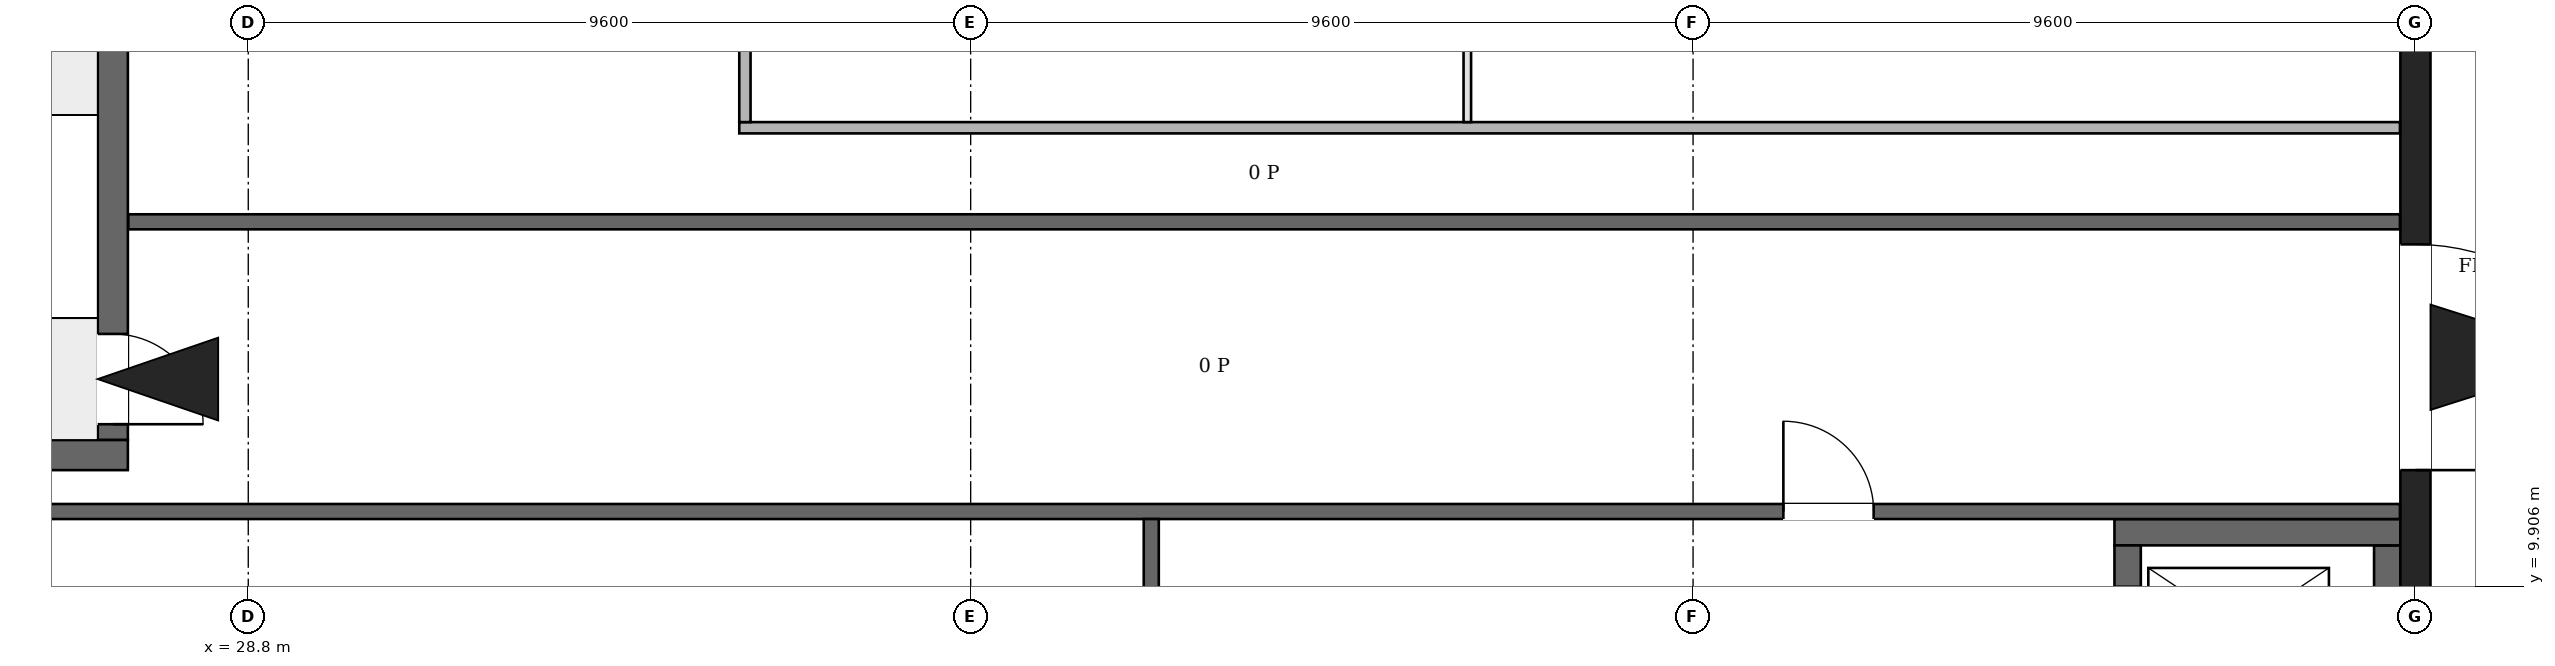
"""IFC4 building model, lengths in metres.
Left out: names, types, materials, properties, quantities, classifications, styles, units other than length and angle.
Written with IfcOpenShell. Run it as: python <this file> out.ifc"""

import sys

from ifc_helpers import new_model, si_unit, direction, frame, frame_2d, origin, place, context, subcontext, project, spatial, rectangle, extrude, element, fill, save


model = new_model("IFC4")
c1 = context("Model", 3, precision=1e-05, world=origin(), true_north=direction((0.0, 1.0)))
c2 = subcontext(c1, "Body", "Model", "MODEL_VIEW")
j1 = project(units=[si_unit("LENGTHUNIT", "METRE"), si_unit("PLANEANGLEUNIT", "RADIAN")], contexts=[c1])
p1 = place(None, origin())
s1 = spatial("IfcSite", under=j1, at=p1, CompositionType="ELEMENT")
p2 = place(p1, origin())
s2 = spatial("IfcBuilding", under=s1, at=p2, CompositionType="ELEMENT")
p3 = place(p2, origin())
s3 = spatial("IfcBuildingStorey", under=s2, at=p3, CompositionType="ELEMENT", Elevation=0.0)
p4 = place(p3, frame((57.6, -0.2, 0.0), z_axis=(0.0, 0.0, 1.0), x_axis=(0.0, 1.0, 0.0)))
e1 = element("IfcWall", 1, at=p4, inside=s3, PredefinedType="SHEAR", context=c2, shape_type="SweptSolid", body=[
    extrude(rectangle(XDim=46.88, YDim=0.4, at=frame_2d((23.44, 0.0))), origin(), (0.0, 0.0, 1.0), 6.5),
])
p5 = place(p4, frame((11.65, 0.0, 0.0)))
e2 = element("IfcOpeningElement", 2, at=p5, cuts=e1, PredefinedType="OPENING", context=c2, shape_type="SweptSolid", body=[
    extrude(rectangle(XDim=3.0, YDim=2.4, at=frame_2d((1.5, 1.2))), frame((0.0, 0.21, 0.0), z_axis=(0.0, -1.0, 0.0), x_axis=(1.0, 0.0, 0.0)), (0.0, 0.0, 1.0), 0.42),
])
p6 = place(p4, frame((38.2, 0.0, 0.0)))
e3 = element("IfcOpeningElement", 3, at=p6, cuts=e1, PredefinedType="OPENING", context=c2, shape_type="SweptSolid", body=[
    extrude(rectangle(XDim=3.0, YDim=2.4, at=frame_2d((1.5, 1.2))), frame((0.0, 0.21, 0.0), z_axis=(0.0, -1.0, 0.0), x_axis=(1.0, 0.0, 0.0)), (0.0, 0.0, 1.0), 0.42),
])
p7 = place(p3, frame((23.0, 11.65, 0.0), z_axis=(0.0, 0.0, 1.0), x_axis=(1.0, 0.0, 0.0)))
e4 = element("IfcWall", 4, at=p7, inside=s3, PredefinedType="SHEAR", context=c2, shape_type="SweptSolid", body=[
    extrude(rectangle(XDim=4.2, YDim=0.4, at=frame_2d((2.1, 0.0))), origin(), (0.0, 0.0, 1.0), 6.5),
])
p8 = place(p3, frame((27.0, 11.85, 0.0), z_axis=(0.0, 0.0, 1.0), x_axis=(0.0, 1.0, 0.0)))
e5 = element("IfcWall", 5, at=p8, inside=s3, PredefinedType="SHEAR", context=c2, shape_type="SweptSolid", body=[
    extrude(rectangle(XDim=6.6, YDim=0.4, at=frame_2d((3.3, 0.0))), origin(), (0.0, 0.0, 1.0), 6.5),
])
p9 = place(p8, frame((0.21, 0.0, 0.0)))
e6 = element("IfcOpeningElement", 6, at=p9, cuts=e5, PredefinedType="OPENING", context=c2, shape_type="SweptSolid", body=[
    extrude(rectangle(XDim=1.2, YDim=2.1, at=frame_2d((0.6, 1.05))), frame((0.0, 0.21, 0.0), z_axis=(0.0, -1.0, 0.0), x_axis=(1.0, 0.0, 0.0)), (0.0, 0.0, 1.0), 0.42),
])
p10 = place(p3, frame((53.6, 10.625, 0.0), z_axis=(0.0, 0.0, 1.0), x_axis=(1.0, 0.0, 0.0)))
e7 = element("IfcWall", 7, at=p10, inside=s3, PredefinedType="SHEAR", context=c2, shape_type="SweptSolid", body=[
    extrude(rectangle(XDim=3.8, YDim=0.35, at=frame_2d((1.9, 0.0))), origin(), (0.0, 0.0, 1.0), 6.5),
])
p11 = place(p3, frame((53.775, 8.25, 0.0), z_axis=(0.0, 0.0, 1.0), x_axis=(0.0, 1.0, 0.0)))
e8 = element("IfcWall", 8, at=p11, inside=s3, PredefinedType="SHEAR", context=c2, shape_type="SweptSolid", body=[
    extrude(rectangle(XDim=2.2, YDim=0.35, at=frame_2d((1.1, 0.0))), origin(), (0.0, 0.0, 1.0), 6.5),
])
p12 = place(p11, frame((0.55, 0.0, 0.0)))
e9 = element("IfcOpeningElement", 9, at=p12, cuts=e8, PredefinedType="OPENING", context=c2, shape_type="SweptSolid", body=[
    extrude(rectangle(XDim=1.1, YDim=2.1, at=frame_2d((0.55, 1.05))), frame((0.0, 0.185, 0.0), z_axis=(0.0, -1.0, 0.0), x_axis=(1.0, 0.0, 0.0)), (0.0, 0.0, 1.0), 0.37),
])
p13 = place(p3, frame((57.225, 8.25, 0.0), z_axis=(0.0, 0.0, 1.0), x_axis=(0.0, 1.0, 0.0)))
e10 = element("IfcWall", 10, at=p13, inside=s3, PredefinedType="SHEAR", context=c2, shape_type="SweptSolid", body=[
    extrude(rectangle(XDim=2.2, YDim=0.35, at=frame_2d((1.1, 0.0))), origin(), (0.0, 0.0, 1.0), 6.5),
])
p14 = place(p3, frame((7.9, 10.9, 0.0), z_axis=(0.0, 0.0, 1.0), x_axis=(1.0, 0.0, 0.0)))
e11 = element("IfcWall", 11, at=p14, inside=s3, PredefinedType="PARTITIONING", context=c2, shape_type="SweptSolid", body=[
    extrude(rectangle(XDim=49.494, YDim=0.2, at=frame_2d((24.747, 0.0))), origin(), (0.0, 0.0, 1.0), 6.15),
])
p15 = place(p14, frame((41.3, 0.0, 0.0)))
e12 = element("IfcOpeningElement", 12, at=p15, cuts=e11, PredefinedType="OPENING", context=c2, shape_type="SweptSolid", body=[
    extrude(rectangle(XDim=1.2, YDim=2.1, at=frame_2d((0.6, 1.05))), frame((0.0, 0.11, 0.0), z_axis=(0.0, -1.0, 0.0), x_axis=(1.0, 0.0, 0.0)), (0.0, 0.0, 1.0), 0.22),
])
p16 = place(p3, frame((27.206, 14.75, 0.0), z_axis=(0.0, 0.0, 1.0), x_axis=(1.0, 0.0, 0.0)))
e13 = element("IfcWall", 13, at=p16, inside=s3, PredefinedType="PARTITIONING", context=c2, shape_type="SweptSolid", body=[
    extrude(rectangle(XDim=30.188, YDim=0.2, at=frame_2d((15.094, 0.0))), origin(), (0.0, 0.0, 1.0), 6.15),
])
p17 = place(p3, frame((35.325, 16.0, 0.0), z_axis=(0.0, 0.0, 1.0), x_axis=(1.0, 0.0, 0.0)))
e14 = element("IfcWall", 14, at=p17, inside=s3, PredefinedType="PARTITIONING", context=c2, shape_type="SweptSolid", body=[
    extrude(rectangle(XDim=22.069, YDim=0.15, at=frame_2d((11.035, 0.0))), origin(), (0.0, 0.0, 1.0), 6.15),
])
p18 = place(p3, frame((35.4, 16.075, 0.0), z_axis=(0.0, 0.0, 1.0), x_axis=(0.0, 1.0, 0.0)))
e15 = element("IfcWall", 15, at=p18, inside=s3, PredefinedType="PARTITIONING", context=c2, shape_type="SweptSolid", body=[
    extrude(rectangle(XDim=10.85, YDim=0.15, at=frame_2d((5.425, 0.0))), origin(), (0.0, 0.0, 1.0), 6.15),
])
p19 = place(p3, frame((40.8, 0.206, 0.0), z_axis=(0.0, 0.0, 1.0), x_axis=(0.0, 1.0, 0.0)))
e16 = element("IfcWall", 16, at=p19, inside=s3, PredefinedType="PARTITIONING", context=c2, shape_type="SweptSolid", body=[
    extrude(rectangle(XDim=10.594, YDim=0.2, at=frame_2d((5.297, 0.0))), origin(), (0.0, 0.0, 1.0), 6.15),
])
p20 = place(p19, frame((6.894, 0.0, 0.0)))
e17 = element("IfcOpeningElement", 17, at=p20, cuts=e16, PredefinedType="OPENING", context=c2, shape_type="SweptSolid", body=[
    extrude(rectangle(XDim=1.8, YDim=2.1, at=frame_2d((0.9, 1.05))), frame((0.0, 0.11, 0.0), z_axis=(0.0, -1.0, 0.0), x_axis=(1.0, 0.0, 0.0)), (0.0, 0.0, 1.0), 0.22),
])
p21 = place(p3, frame((45.0, 16.075, 0.0), z_axis=(0.0, 0.0, 1.0), x_axis=(0.0, 1.0, 0.0)))
e18 = element("IfcWall", 18, at=p21, inside=s3, PredefinedType="PARTITIONING", context=c2, shape_type="SweptSolid", body=[
    extrude(rectangle(XDim=10.85, YDim=0.1, at=frame_2d((5.425, 0.0))), origin(), (0.0, 0.0, 1.0), 6.15),
])
p22 = place(p5, frame((3.0, 0.0, 0.0), z_axis=(0.0, 0.0, 1.0), x_axis=(-1.0, 0.0, 0.0)))
e19 = element("IfcDoor", 19, at=p22, inside=s3, OperationType="DOUBLE_DOOR_SINGLE_SWING", PredefinedType="DOOR", context=c2, shape_type="SweptSolid", body=[
    extrude(rectangle(XDim=3.0, YDim=2.4, at=frame_2d((1.5, 1.2))), frame((0.0, 0.025, 0.0), z_axis=(0.0, -1.0, 0.0), x_axis=(1.0, 0.0, 0.0)), (0.0, 0.0, 1.0), 0.05),
])
fill(e2, e19)
p23 = place(p9, origin())
e20 = element("IfcDoor", 20, at=p23, inside=s3, OperationType="SINGLE_SWING_LEFT", PredefinedType="DOOR", context=c2, shape_type="SweptSolid", body=[
    extrude(rectangle(XDim=1.2, YDim=2.1, at=frame_2d((0.6, 1.05))), frame((0.0, 0.025, 0.0), z_axis=(0.0, -1.0, 0.0), x_axis=(1.0, 0.0, 0.0)), (0.0, 0.0, 1.0), 0.05),
])
fill(e6, e20)
p24 = place(p12, origin())
e21 = element("IfcDoor", 21, at=p24, inside=s3, OperationType="DOUBLE_DOOR_SLIDING", PredefinedType="DOOR", context=c2, shape_type="SweptSolid", body=[
    extrude(rectangle(XDim=1.1, YDim=2.1, at=frame_2d((0.55, 1.05))), frame((0.0, 0.025, 0.0), z_axis=(0.0, -1.0, 0.0), x_axis=(1.0, 0.0, 0.0)), (0.0, 0.0, 1.0), 0.05),
])
fill(e9, e21)
p25 = place(p15, origin())
e22 = element("IfcDoor", 22, at=p25, inside=s3, OperationType="SINGLE_SWING_LEFT", PredefinedType="DOOR", context=c2, shape_type="SweptSolid", body=[
    extrude(rectangle(XDim=1.2, YDim=2.1, at=frame_2d((0.6, 1.05))), frame((0.0, 0.025, 0.0), z_axis=(0.0, -1.0, 0.0), x_axis=(1.0, 0.0, 0.0)), (0.0, 0.0, 1.0), 0.05),
])
fill(e12, e22)
save(model, sys.argv[1])
